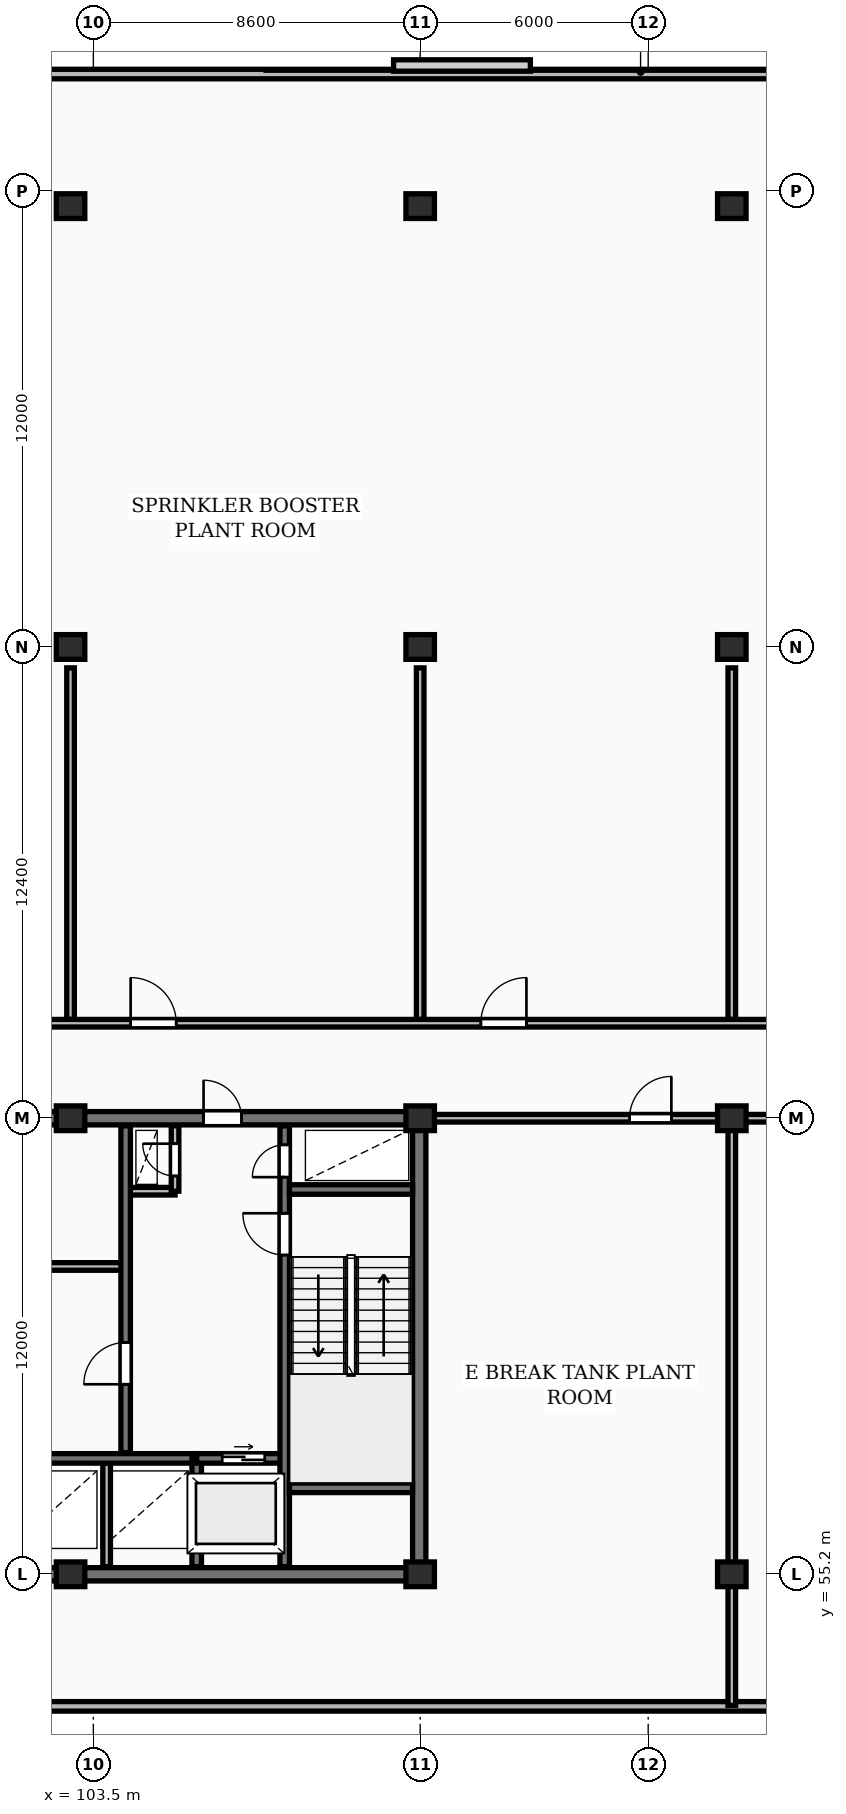
"""IFC4 building model, lengths in metres.
Left out: names, types, materials, properties, quantities, classifications, styles, units other than length and angle.
Written with IfcOpenShell. Run it as: python <this file> out.ifc"""

import sys

from ifc_helpers import new_model, si_unit, direction, frame, frame_2d, origin, origin_2d, place, context, subcontext, project, spatial, rectangle, extrude, element, fill, save


model = new_model("IFC4")
c1 = context("Model", 3, precision=1e-05, world=origin(), true_north=direction((0.0, 1.0)))
c2 = subcontext(c1, "Body", "Model", "MODEL_VIEW")
j1 = project(units=[si_unit("LENGTHUNIT", "METRE"), si_unit("PLANEANGLEUNIT", "RADIAN")], contexts=[c1])
p1 = place(None, origin())
s1 = spatial("IfcSite", under=j1, at=p1, CompositionType="ELEMENT")
p2 = place(p1, origin())
s2 = spatial("IfcBuilding", under=s1, at=p2, CompositionType="ELEMENT")
p3 = place(p2, frame((0.0, 0.0, 259.7)))
s3 = spatial("IfcBuildingStorey", under=s2, at=p3, CompositionType="ELEMENT", Elevation=259.7)
for number, where, z_axis, x_axis in (
    (1, (102.9, 55.2, 0.0), (0.0, 0.0, 1.0), (1.0, 0.0, 0.0)),
    (2, (102.9, 67.2, 0.0), (0.0, 0.0, 1.0), (1.0, 0.0, 0.0)),
    (3, (102.9, 79.6, 0.0), (0.0, 0.0, 1.0), (1.0, 0.0, 0.0)),
    (4, (102.9, 91.2, 0.0), (0.0, 0.0, 1.0), (1.0, 0.0, 0.0)),
    (5, (112.1, 55.2, 0.0), (0.0, 0.0, 1.0), (1.0, 0.0, 0.0)),
    (6, (112.1, 67.2, 0.0), (0.0, 0.0, 1.0), (1.0, 0.0, 0.0)),
    (7, (112.1, 79.6, 0.0), (0.0, 0.0, 1.0), (1.0, 0.0, 0.0)),
    (8, (112.1, 91.2, 0.0), (0.0, 0.0, 1.0), (1.0, 0.0, 0.0)),
    (9, (120.3, 55.2, 0.0), (0.0, 0.0, 1.0), (1.0, 0.0, 0.0)),
    (10, (120.3, 67.2, 0.0), (0.0, 0.0, 1.0), (1.0, 0.0, 0.0)),
    (11, (120.3, 79.6, 0.0), (0.0, 0.0, 1.0), (1.0, 0.0, 0.0)),
    (12, (120.3, 91.2, 0.0), (0.0, 0.0, 1.0), (1.0, 0.0, 0.0)),
):
    element("IfcColumn", number, at=place(p3, frame(where, z_axis=z_axis, x_axis=x_axis)), inside=s3, PredefinedType="COLUMN", context=c2, shape_type="SweptSolid", body=[
        extrude(rectangle(XDim=0.75, YDim=0.65, at=origin_2d()), origin(), (0.0, 0.0, 1.0), 4.5),
    ])
for number, where, z_axis, x_axis in (
    (13, (59.8, 51.725, 0.0), (0.0, 0.0, 1.0), (1.0, 0.0, 0.0)),
    (14, (128.4, 94.675, 0.0), (0.0, 0.0, 1.0), (-1.0, 0.0, 0.0)),
):
    element("IfcWall", number, at=place(p3, frame(where, z_axis=z_axis, x_axis=x_axis)), inside=s3, PredefinedType="SHEAR", context=c2, shape_type="SweptSolid", body=[
        extrude(rectangle(XDim=68.6, YDim=0.25, at=frame_2d((34.3, 0.0))), origin(), (0.0, 0.0, 1.0), 4.23),
    ])
p4 = place(p3, frame((75.95, 55.2, 0.0), z_axis=(0.0, 0.0, 1.0), x_axis=(1.0, 0.0, 0.0)))
e15 = element("IfcWall", 15, at=p4, inside=s3, PredefinedType="SHEAR", context=c2, shape_type="SweptSolid", body=[
    extrude(rectangle(XDim=36.3, YDim=0.35, at=frame_2d((18.15, 0.0))), origin(), (0.0, 0.0, 1.0), 4.5),
])
p5 = place(p3, frame((112.075, 55.375, 0.0), z_axis=(0.0, 0.0, 1.0), x_axis=(0.0, 1.0, 0.0)))
e16 = element("IfcWall", 16, at=p5, inside=s3, PredefinedType="SHEAR", context=c2, shape_type="SweptSolid", body=[
    extrude(rectangle(XDim=11.65, YDim=0.35, at=frame_2d((5.825, 0.0))), origin(), (0.0, 0.0, 1.0), 4.5),
])
p6 = place(p3, frame((75.95, 67.2, 0.0), z_axis=(0.0, 0.0, 1.0), x_axis=(1.0, 0.0, 0.0)))
e17 = element("IfcWall", 17, at=p6, inside=s3, PredefinedType="SHEAR", context=c2, shape_type="SweptSolid", body=[
    extrude(rectangle(XDim=36.3, YDim=0.35, at=frame_2d((18.15, 0.0))), origin(), (0.0, 0.0, 1.0), 4.5),
])
p7 = place(p6, frame((5.25, 0.0, 0.0)))
e18 = element("IfcOpeningElement", 18, at=p7, cuts=e17, PredefinedType="OPENING", context=c2, shape_type="SweptSolid", body=[
    extrude(rectangle(XDim=1.0, YDim=2.15, at=frame_2d((0.5, 1.075))), frame((0.0, 0.185, 0.0), z_axis=(0.0, -1.0, 0.0), x_axis=(1.0, 0.0, 0.0)), (0.0, 0.0, 1.0), 0.37),
])
p8 = place(p6, frame((21.6, 0.0, 0.0)))
e19 = element("IfcOpeningElement", 19, at=p8, cuts=e17, PredefinedType="OPENING", context=c2, shape_type="SweptSolid", body=[
    extrude(rectangle(XDim=1.5, YDim=2.2, at=frame_2d((0.75, 1.1))), frame((0.0, 0.185, 0.0), z_axis=(0.0, -1.0, 0.0), x_axis=(1.0, 0.0, 0.0)), (0.0, 0.0, 1.0), 0.37),
])
p9 = place(p6, frame((30.45, 0.0, 0.0)))
e20 = element("IfcOpeningElement", 20, at=p9, cuts=e17, PredefinedType="OPENING", context=c2, shape_type="SweptSolid", body=[
    extrude(rectangle(XDim=1.0, YDim=2.15, at=frame_2d((0.5, 1.075))), frame((0.0, 0.185, 0.0), z_axis=(0.0, -1.0, 0.0), x_axis=(1.0, 0.0, 0.0)), (0.0, 0.0, 1.0), 0.37),
])
p10 = place(p3, frame((103.85, 55.4, 0.0), z_axis=(0.0, 0.0, 1.0), x_axis=(0.0, 1.0, 0.0)))
e21 = element("IfcWall", 21, at=p10, inside=s3, PredefinedType="PARTITIONING", context=c2, shape_type="SweptSolid", body=[
    extrude(rectangle(XDim=2.72, YDim=0.2, at=frame_2d((1.36, 0.0))), origin(), (0.0, 0.0, 1.0), 4.23),
])
p11 = place(p3, frame((101.55, 58.25, 0.0), z_axis=(0.0, 0.0, 1.0), x_axis=(1.0, 0.0, 0.0)))
e22 = element("IfcWall", 22, at=p11, inside=s3, PredefinedType="SHEAR", context=c2, shape_type="SweptSolid", body=[
    extrude(rectangle(XDim=4.6, YDim=0.25, at=frame_2d((2.3, 0.0))), origin(), (0.0, 0.0, 1.0), 4.5),
])
p12 = place(p3, frame((106.22, 55.4, 0.0), z_axis=(0.0, 0.0, 1.0), x_axis=(0.0, 1.0, 0.0)))
e23 = element("IfcWall", 23, at=p12, inside=s3, PredefinedType="SHEAR", context=c2, shape_type="SweptSolid", body=[
    extrude(rectangle(XDim=2.85, YDim=0.25, at=frame_2d((1.425, 0.0))), origin(), (0.0, 0.0, 1.0), 4.5),
])
p13 = place(p3, frame((106.22, 58.25, 0.0), z_axis=(0.0, 0.0, 1.0), x_axis=(1.0, 0.0, 0.0)))
e24 = element("IfcWall", 24, at=p13, inside=s3, PredefinedType="SHEAR", context=c2, shape_type="SweptSolid", body=[
    extrude(rectangle(XDim=2.46, YDim=0.25, at=frame_2d((1.23, 0.0))), origin(), (0.0, 0.0, 1.0), 4.5),
])
p14 = place(p13, frame((0.67, 0.0, 0.0)))
e25 = element("IfcOpeningElement", 25, at=p14, cuts=e24, PredefinedType="OPENING", context=c2, shape_type="SweptSolid", body=[
    extrude(rectangle(XDim=1.12, YDim=2.12, at=frame_2d((0.56, 1.06))), frame((0.0, 0.135, 0.0), z_axis=(0.0, -1.0, 0.0), x_axis=(1.0, 0.0, 0.0)), (0.0, 0.0, 1.0), 0.27),
])
p15 = place(p3, frame((84.42, 63.3, 0.0), z_axis=(0.0, 0.0, 1.0), x_axis=(1.0, 0.0, 0.0)))
e26 = element("IfcWall", 26, at=p15, inside=s3, PredefinedType="PARTITIONING", context=c2, shape_type="SweptSolid", body=[
    extrude(rectangle(XDim=19.83, YDim=0.2, at=frame_2d((9.915, 0.0))), origin(), (0.0, 0.0, 1.0), 4.23),
])
p16 = place(p15, frame((1.15, 0.0, 0.0)))
e27 = element("IfcOpeningElement", 27, at=p16, cuts=e26, PredefinedType="OPENING", context=c2, shape_type="SweptSolid", body=[
    extrude(rectangle(XDim=0.85, YDim=2.05, at=frame_2d((0.425, 1.025))), frame((0.0, 0.11, 0.0), z_axis=(0.0, -1.0, 0.0), x_axis=(1.0, 0.0, 0.0)), (0.0, 0.0, 1.0), 0.22),
])
p17 = place(p15, frame((3.25, 0.0, 0.0)))
e28 = element("IfcOpeningElement", 28, at=p17, cuts=e26, PredefinedType="OPENING", context=c2, shape_type="SweptSolid", body=[
    extrude(rectangle(XDim=0.85, YDim=2.05, at=frame_2d((0.425, 1.025))), frame((0.0, 0.11, 0.0), z_axis=(0.0, -1.0, 0.0), x_axis=(1.0, 0.0, 0.0)), (0.0, 0.0, 1.0), 0.22),
])
p18 = place(p15, frame((13.08, 0.0, 0.0)))
e29 = element("IfcOpeningElement", 29, at=p18, cuts=e26, PredefinedType="OPENING", context=c2, shape_type="SweptSolid", body=[
    extrude(rectangle(XDim=1.5, YDim=2.2, at=frame_2d((0.75, 1.1))), frame((0.0, 0.11, 0.0), z_axis=(0.0, -1.0, 0.0), x_axis=(1.0, 0.0, 0.0)), (0.0, 0.0, 1.0), 0.22),
])
p19 = place(p15, frame((6.78, 0.0, 0.0)))
e30 = element("IfcOpeningElement", 30, at=p19, cuts=e26, PredefinedType="OPENING", context=c2, shape_type="SweptSolid", body=[
    extrude(rectangle(XDim=0.92, YDim=2.08, at=frame_2d((0.46, 1.04))), frame((0.0, 0.11, 0.0), z_axis=(0.0, -1.0, 0.0), x_axis=(1.0, 0.0, 0.0)), (0.0, 0.0, 1.0), 0.22),
])
p20 = place(p15, frame((16.28, 0.0, 0.0)))
e31 = element("IfcOpeningElement", 31, at=p20, cuts=e26, PredefinedType="OPENING", context=c2, shape_type="SweptSolid", body=[
    extrude(rectangle(XDim=0.92, YDim=2.08, at=frame_2d((0.46, 1.04))), frame((0.0, 0.11, 0.0), z_axis=(0.0, -1.0, 0.0), x_axis=(1.0, 0.0, 0.0)), (0.0, 0.0, 1.0), 0.22),
])
p21 = place(p3, frame((104.45, 65.28, 0.0), z_axis=(0.0, 0.0, 1.0), x_axis=(1.0, 0.0, 0.0)))
e32 = element("IfcWall", 32, at=p21, inside=s3, PredefinedType="PARTITIONING", context=c2, shape_type="SweptSolid", body=[
    extrude(rectangle(XDim=1.2, YDim=0.2, at=frame_2d((0.6, 0.0))), origin(), (0.0, 0.0, 1.0), 4.23),
])
p22 = place(p3, frame((105.65, 65.28, 0.0), z_axis=(0.0, 0.0, 1.0), x_axis=(0.0, 1.0, 0.0)))
e33 = element("IfcWall", 33, at=p22, inside=s3, PredefinedType="PARTITIONING", context=c2, shape_type="SweptSolid", body=[
    extrude(rectangle(XDim=1.72, YDim=0.2, at=frame_2d((0.86, 0.0))), origin(), (0.0, 0.0, 1.0), 4.23),
])
p23 = place(p22, frame((0.4, 0.0, 0.0)))
e34 = element("IfcOpeningElement", 34, at=p23, cuts=e33, PredefinedType="OPENING", context=c2, shape_type="SweptSolid", body=[
    extrude(rectangle(XDim=0.85, YDim=2.05, at=frame_2d((0.425, 1.025))), frame((0.0, 0.11, 0.0), z_axis=(0.0, -1.0, 0.0), x_axis=(1.0, 0.0, 0.0)), (0.0, 0.0, 1.0), 0.22),
])
p24 = place(p3, frame((104.35, 58.4, 0.0), z_axis=(0.0, 0.0, 1.0), x_axis=(0.0, 1.0, 0.0)))
e35 = element("IfcWall", 35, at=p24, inside=s3, PredefinedType="SHEAR", context=c2, shape_type="SweptSolid", body=[
    extrude(rectangle(XDim=8.6, YDim=0.25, at=frame_2d((4.3, 0.0))), origin(), (0.0, 0.0, 1.0), 4.5),
])
p25 = place(p24, frame((1.8, 0.0, 0.0)))
e36 = element("IfcOpeningElement", 36, at=p25, cuts=e35, PredefinedType="OPENING", context=c2, shape_type="SweptSolid", body=[
    extrude(rectangle(XDim=1.1, YDim=2.1, at=frame_2d((0.55, 1.05))), frame((0.0, 0.135, 0.0), z_axis=(0.0, -1.0, 0.0), x_axis=(1.0, 0.0, 0.0)), (0.0, 0.0, 1.0), 0.27),
])
p26 = place(p3, frame((108.535, 55.4, 0.0), z_axis=(0.0, 0.0, 1.0), x_axis=(0.0, 1.0, 0.0)))
e37 = element("IfcWall", 37, at=p26, inside=s3, PredefinedType="SHEAR", context=c2, shape_type="SweptSolid", body=[
    extrude(rectangle(XDim=11.6, YDim=0.25, at=frame_2d((5.8, 0.0))), origin(), (0.0, 0.0, 1.0), 4.5),
])
p27 = place(p26, frame((8.2, 0.0, 0.0)))
e38 = element("IfcOpeningElement", 38, at=p27, cuts=e37, PredefinedType="OPENING", context=c2, shape_type="SweptSolid", body=[
    extrude(rectangle(XDim=1.1, YDim=2.1, at=frame_2d((0.55, 1.05))), frame((0.0, 0.135, 0.0), z_axis=(0.0, -1.0, 0.0), x_axis=(1.0, 0.0, 0.0)), (0.0, 0.0, 1.0), 0.27),
])
p28 = place(p26, frame((10.25, 0.0, 0.0)))
e39 = element("IfcOpeningElement", 39, at=p28, cuts=e37, PredefinedType="OPENING", context=c2, shape_type="SweptSolid", body=[
    extrude(rectangle(XDim=0.85, YDim=2.05, at=frame_2d((0.425, 1.025))), frame((0.0, 0.135, 0.0), z_axis=(0.0, -1.0, 0.0), x_axis=(1.0, 0.0, 0.0)), (0.0, 0.0, 1.0), 0.27),
])
for number, where, z_axis, x_axis in (
    (40, (108.66, 57.475, 0.0), (0.0, 0.0, 1.0), (1.0, 0.0, 0.0)),
    (41, (108.66, 65.325, 0.0), (0.0, 0.0, 1.0), (1.0, 0.0, 0.0)),
):
    element("IfcWall", number, at=place(p3, frame(where, z_axis=z_axis, x_axis=x_axis)), inside=s3, PredefinedType="SHEAR", context=c2, shape_type="SweptSolid", body=[
        extrude(rectangle(XDim=3.24, YDim=0.25, at=frame_2d((1.62, 0.0))), origin(), (0.0, 0.0, 1.0), 4.5),
    ])
for number, where, z_axis, x_axis in (
    (42, (102.9, 69.8, 0.0), (0.0, 0.0, 1.0), (0.0, 1.0, 0.0)),
    (43, (112.1, 69.8, 0.0), (0.0, 0.0, 1.0), (0.0, 1.0, 0.0)),
    (44, (120.3, 69.8, 0.0), (0.0, 0.0, 1.0), (0.0, 1.0, 0.0)),
):
    element("IfcWall", number, at=place(p3, frame(where, z_axis=z_axis, x_axis=x_axis)), inside=s3, PredefinedType="PARTITIONING", context=c2, shape_type="SweptSolid", body=[
        extrude(rectangle(XDim=9.25, YDim=0.2, at=frame_2d((4.625, 0.0))), origin(), (0.0, 0.0, 1.0), 3.537),
    ])
p29 = place(p3, frame((59.8, 69.7, 0.0), z_axis=(0.0, 0.0, 1.0), x_axis=(1.0, 0.0, 0.0)))
e45 = element("IfcWall", 45, at=p29, inside=s3, PredefinedType="PARTITIONING", context=c2, shape_type="SweptSolid", body=[
    extrude(rectangle(XDim=68.6, YDim=0.2, at=frame_2d((34.3, 0.0))), origin(), (0.0, 0.0, 1.0), 4.23),
])
p30 = place(p29, frame((5.372, 0.0, 0.0)))
e46 = element("IfcOpeningElement", 46, at=p30, cuts=e45, PredefinedType="OPENING", context=c2, shape_type="SweptSolid", body=[
    extrude(rectangle(XDim=1.2, YDim=2.15, at=frame_2d((0.6, 1.075))), frame((0.0, 0.11, 0.0), z_axis=(0.0, -1.0, 0.0), x_axis=(1.0, 0.0, 0.0)), (0.0, 0.0, 1.0), 0.22),
])
p31 = place(p29, frame((13.514, 0.0, 0.0)))
e47 = element("IfcOpeningElement", 47, at=p31, cuts=e45, PredefinedType="OPENING", context=c2, shape_type="SweptSolid", body=[
    extrude(rectangle(XDim=1.2, YDim=2.15, at=frame_2d((0.6, 1.075))), frame((0.0, 0.11, 0.0), z_axis=(0.0, -1.0, 0.0), x_axis=(1.0, 0.0, 0.0)), (0.0, 0.0, 1.0), 0.22),
])
p32 = place(p29, frame((21.884, 0.0, 0.0)))
e48 = element("IfcOpeningElement", 48, at=p32, cuts=e45, PredefinedType="OPENING", context=c2, shape_type="SweptSolid", body=[
    extrude(rectangle(XDim=1.2, YDim=2.15, at=frame_2d((0.6, 1.075))), frame((0.0, 0.11, 0.0), z_axis=(0.0, -1.0, 0.0), x_axis=(1.0, 0.0, 0.0)), (0.0, 0.0, 1.0), 0.22),
])
p33 = place(p29, frame((31.119, 0.0, 0.0)))
e49 = element("IfcOpeningElement", 49, at=p33, cuts=e45, PredefinedType="OPENING", context=c2, shape_type="SweptSolid", body=[
    extrude(rectangle(XDim=1.2, YDim=2.15, at=frame_2d((0.6, 1.075))), frame((0.0, 0.11, 0.0), z_axis=(0.0, -1.0, 0.0), x_axis=(1.0, 0.0, 0.0)), (0.0, 0.0, 1.0), 0.22),
])
p34 = place(p29, frame((35.481, 0.0, 0.0)))
e50 = element("IfcOpeningElement", 50, at=p34, cuts=e45, PredefinedType="OPENING", context=c2, shape_type="SweptSolid", body=[
    extrude(rectangle(XDim=1.2, YDim=2.15, at=frame_2d((0.6, 1.075))), frame((0.0, 0.11, 0.0), z_axis=(0.0, -1.0, 0.0), x_axis=(1.0, 0.0, 0.0)), (0.0, 0.0, 1.0), 0.22),
])
p35 = place(p29, frame((44.681, 0.0, 0.0)))
e51 = element("IfcOpeningElement", 51, at=p35, cuts=e45, PredefinedType="OPENING", context=c2, shape_type="SweptSolid", body=[
    extrude(rectangle(XDim=1.2, YDim=2.15, at=frame_2d((0.6, 1.075))), frame((0.0, 0.11, 0.0), z_axis=(0.0, -1.0, 0.0), x_axis=(1.0, 0.0, 0.0)), (0.0, 0.0, 1.0), 0.22),
])
p36 = place(p29, frame((53.896, 0.0, 0.0)))
e52 = element("IfcOpeningElement", 52, at=p36, cuts=e45, PredefinedType="OPENING", context=c2, shape_type="SweptSolid", body=[
    extrude(rectangle(XDim=1.2, YDim=2.15, at=frame_2d((0.6, 1.075))), frame((0.0, 0.11, 0.0), z_axis=(0.0, -1.0, 0.0), x_axis=(1.0, 0.0, 0.0)), (0.0, 0.0, 1.0), 0.22),
])
p37 = place(p29, frame((62.118, 0.0, 0.0)))
e53 = element("IfcOpeningElement", 53, at=p37, cuts=e45, PredefinedType="OPENING", context=c2, shape_type="SweptSolid", body=[
    extrude(rectangle(XDim=1.2, YDim=2.15, at=frame_2d((0.6, 1.075))), frame((0.0, 0.11, 0.0), z_axis=(0.0, -1.0, 0.0), x_axis=(1.0, 0.0, 0.0)), (0.0, 0.0, 1.0), 0.22),
])
p38 = place(p3, frame((120.3, 51.75, 0.0), z_axis=(0.0, 0.0, 1.0), x_axis=(0.0, 1.0, 0.0)))
e54 = element("IfcWall", 54, at=p38, inside=s3, PredefinedType="PARTITIONING", context=c2, shape_type="SweptSolid", body=[
    extrude(rectangle(XDim=15.4, YDim=0.2, at=frame_2d((7.7, 0.0))), origin(), (0.0, 0.0, 1.0), 3.537),
])
p39 = place(p3, frame((112.25, 67.2, 0.0), z_axis=(0.0, 0.0, 1.0), x_axis=(1.0, 0.0, 0.0)))
e55 = element("IfcWall", 55, at=p39, inside=s3, PredefinedType="PARTITIONING", context=c2, shape_type="SweptSolid", body=[
    extrude(rectangle(XDim=16.1, YDim=0.2, at=frame_2d((8.05, 0.0))), origin(), (0.0, 0.0, 1.0), 3.61),
])
p40 = place(p39, frame((5.36, 0.0, 0.0)))
e56 = element("IfcOpeningElement", 56, at=p40, cuts=e55, PredefinedType="OPENING", context=c2, shape_type="SweptSolid", body=[
    extrude(rectangle(XDim=1.1, YDim=2.1, at=frame_2d((0.55, 1.05))), frame((0.0, 0.11, 0.0), z_axis=(0.0, -1.0, 0.0), x_axis=(1.0, 0.0, 0.0)), (0.0, 0.0, 1.0), 0.22),
])
p41 = place(p39, frame((9.65, 0.0, 0.0)))
e57 = element("IfcOpeningElement", 57, at=p41, cuts=e55, PredefinedType="OPENING", context=c2, shape_type="SweptSolid", body=[
    extrude(rectangle(XDim=1.1, YDim=2.1, at=frame_2d((0.55, 1.05))), frame((0.0, 0.11, 0.0), z_axis=(0.0, -1.0, 0.0), x_axis=(1.0, 0.0, 0.0)), (0.0, 0.0, 1.0), 0.22),
])
p42 = place(p9, origin())
e58 = element("IfcDoor", 58, at=p42, inside=s3, OperationType="SINGLE_SWING_LEFT", PredefinedType="DOOR", context=c2, shape_type="SweptSolid", body=[
    extrude(rectangle(XDim=1.0, YDim=2.15, at=frame_2d((0.5, 1.075))), frame((0.0, 0.025, 0.0), z_axis=(0.0, -1.0, 0.0), x_axis=(1.0, 0.0, 0.0)), (0.0, 0.0, 1.0), 0.05),
])
fill(e20, e58)
p43 = place(p14, origin())
e59 = element("IfcDoor", 59, at=p43, inside=s3, OperationType="SLIDING_TO_RIGHT", PredefinedType="DOOR", context=c2, shape_type="SweptSolid", body=[
    extrude(rectangle(XDim=1.12, YDim=2.12, at=frame_2d((0.56, 1.06))), frame((0.0, 0.025, 0.0), z_axis=(0.0, -1.0, 0.0), x_axis=(1.0, 0.0, 0.0)), (0.0, 0.0, 1.0), 0.05),
])
fill(e25, e59)
p44 = place(p23, origin())
e60 = element("IfcDoor", 60, at=p44, inside=s3, OperationType="SINGLE_SWING_RIGHT", PredefinedType="DOOR", context=c2, shape_type="SweptSolid", body=[
    extrude(rectangle(XDim=0.85, YDim=2.05, at=frame_2d((0.425, 1.025))), frame((0.0, 0.025, 0.0), z_axis=(0.0, -1.0, 0.0), x_axis=(1.0, 0.0, 0.0)), (0.0, 0.0, 1.0), 0.05),
])
fill(e34, e60)
p45 = place(p25, origin())
e61 = element("IfcDoor", 61, at=p45, inside=s3, OperationType="SINGLE_SWING_LEFT", PredefinedType="DOOR", context=c2, shape_type="SweptSolid", body=[
    extrude(rectangle(XDim=1.1, YDim=2.1, at=frame_2d((0.55, 1.05))), frame((0.0, 0.025, 0.0), z_axis=(0.0, -1.0, 0.0), x_axis=(1.0, 0.0, 0.0)), (0.0, 0.0, 1.0), 0.05),
])
fill(e36, e61)
p46 = place(p27, origin())
e62 = element("IfcDoor", 62, at=p46, inside=s3, OperationType="SINGLE_SWING_RIGHT", PredefinedType="DOOR", context=c2, shape_type="SweptSolid", body=[
    extrude(rectangle(XDim=1.1, YDim=2.1, at=frame_2d((0.55, 1.05))), frame((0.0, 0.025, 0.0), z_axis=(0.0, -1.0, 0.0), x_axis=(1.0, 0.0, 0.0)), (0.0, 0.0, 1.0), 0.05),
])
fill(e38, e62)
p47 = place(p28, origin())
e63 = element("IfcDoor", 63, at=p47, inside=s3, OperationType="SINGLE_SWING_LEFT", PredefinedType="DOOR", context=c2, shape_type="SweptSolid", body=[
    extrude(rectangle(XDim=0.85, YDim=2.05, at=frame_2d((0.425, 1.025))), frame((0.0, 0.025, 0.0), z_axis=(0.0, -1.0, 0.0), x_axis=(1.0, 0.0, 0.0)), (0.0, 0.0, 1.0), 0.05),
])
fill(e39, e63)
p48 = place(p35, origin())
e64 = element("IfcDoor", 64, at=p48, inside=s3, OperationType="SINGLE_SWING_LEFT", PredefinedType="DOOR", context=c2, shape_type="SweptSolid", body=[
    extrude(rectangle(XDim=1.2, YDim=2.15, at=frame_2d((0.6, 1.075))), frame((0.0, 0.025, 0.0), z_axis=(0.0, -1.0, 0.0), x_axis=(1.0, 0.0, 0.0)), (0.0, 0.0, 1.0), 0.05),
])
fill(e51, e64)
p49 = place(p36, origin())
e65 = element("IfcDoor", 65, at=p49, inside=s3, OperationType="SINGLE_SWING_RIGHT", PredefinedType="DOOR", context=c2, shape_type="SweptSolid", body=[
    extrude(rectangle(XDim=1.2, YDim=2.15, at=frame_2d((0.6, 1.075))), frame((0.0, 0.025, 0.0), z_axis=(0.0, -1.0, 0.0), x_axis=(1.0, 0.0, 0.0)), (0.0, 0.0, 1.0), 0.05),
])
fill(e52, e65)
p50 = place(p40, origin())
e66 = element("IfcDoor", 66, at=p50, inside=s3, OperationType="SINGLE_SWING_RIGHT", PredefinedType="DOOR", context=c2, shape_type="SweptSolid", body=[
    extrude(rectangle(XDim=1.1, YDim=2.1, at=frame_2d((0.55, 1.05))), frame((0.0, 0.025, 0.0), z_axis=(0.0, -1.0, 0.0), x_axis=(1.0, 0.0, 0.0)), (0.0, 0.0, 1.0), 0.05),
])
fill(e56, e66)
save(model, sys.argv[1])
